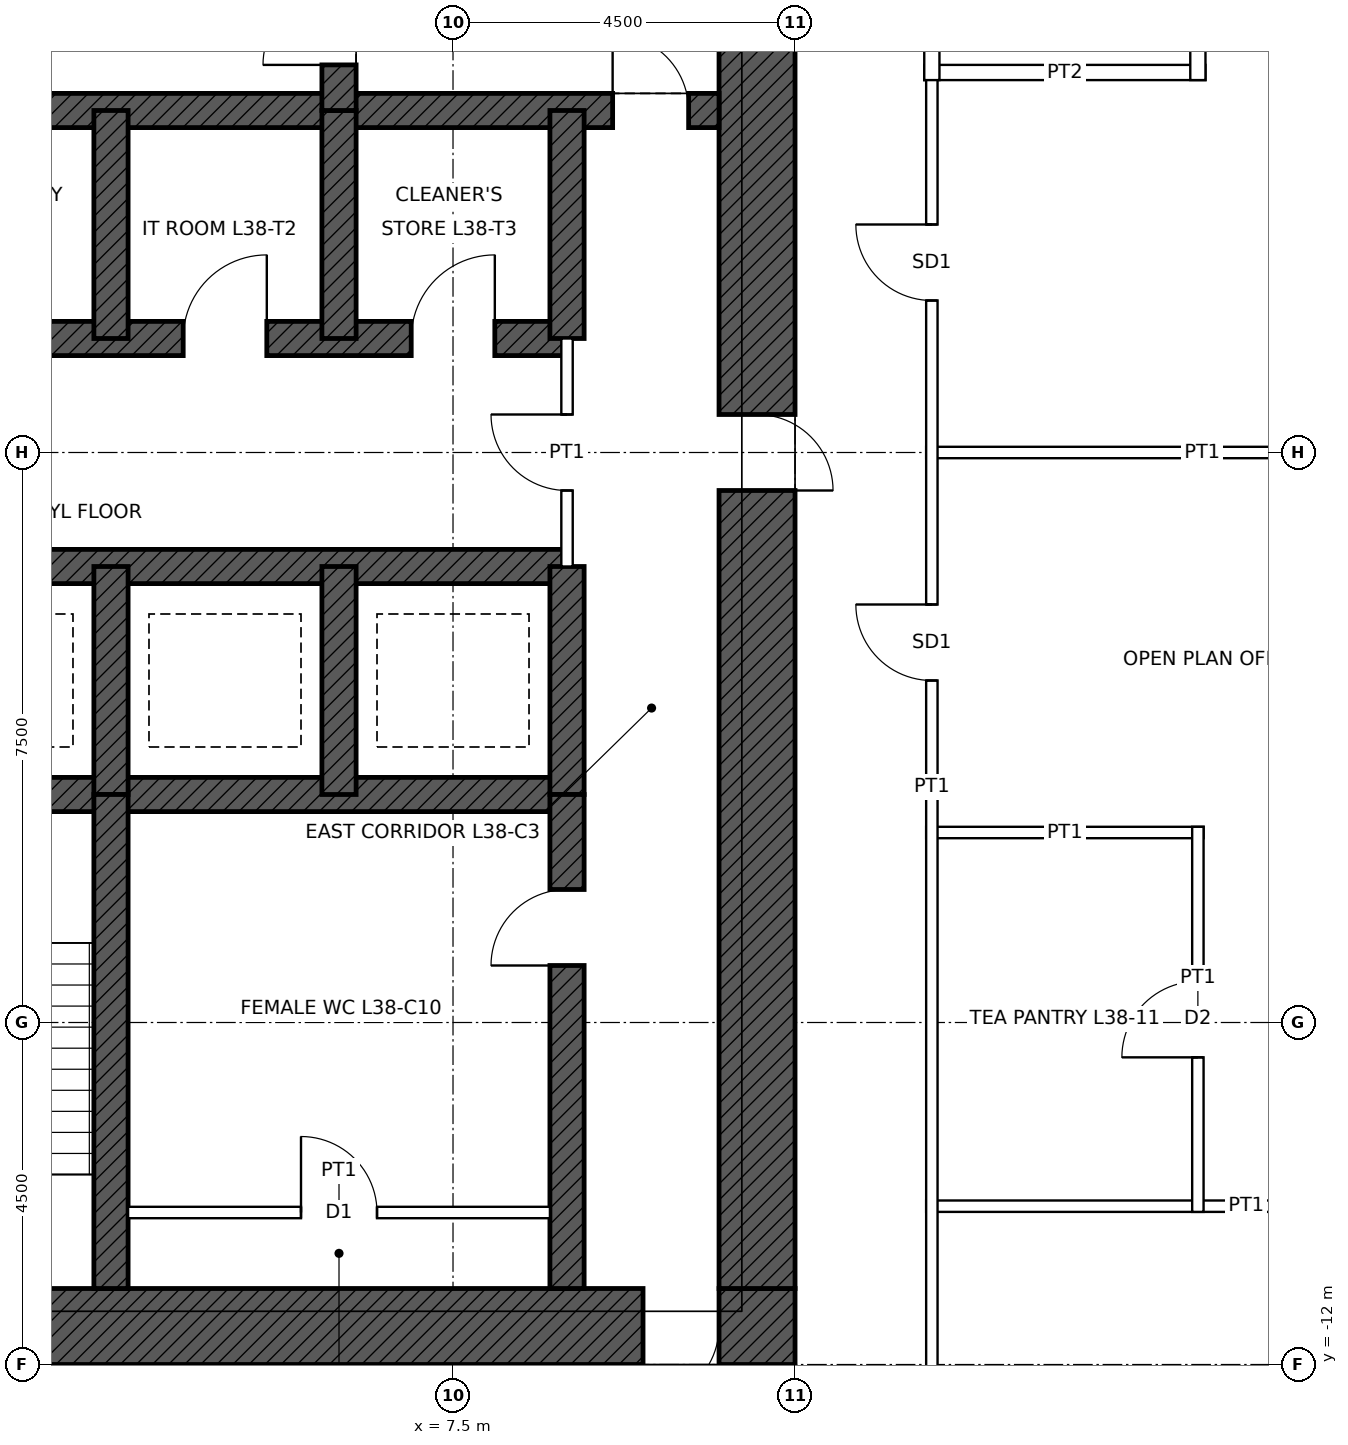
"""IFC4 building model, lengths in metres.
Left out: names, types, materials, properties, quantities, classifications, styles, units other than length and angle.
Written with IfcOpenShell. Run it as: python <this file> out.ifc"""

import sys

from ifc_helpers import new_model, si_unit, direction, frame, frame_2d, origin, place, context, subcontext, project, spatial, rectangle, extrude, element, fill, save


model = new_model("IFC4")
c1 = context("Model", 3, precision=1e-05, world=origin(), true_north=direction((0.0, 1.0)))
c2 = subcontext(c1, "Body", "Model", "MODEL_VIEW")
j1 = project(units=[si_unit("LENGTHUNIT", "METRE"), si_unit("PLANEANGLEUNIT", "RADIAN")], contexts=[c1])
p1 = place(None, origin())
s1 = spatial("IfcSite", under=j1, at=p1, CompositionType="ELEMENT")
p2 = place(p1, origin())
s2 = spatial("IfcBuilding", under=s1, at=p2, CompositionType="ELEMENT")
p3 = place(p2, frame((0.0, 0.0, 185.9)))
s3 = spatial("IfcBuildingStorey", under=s2, at=p3, CompositionType="ELEMENT", Elevation=185.9)
p4 = place(p3, frame((12.0, -11.5, 0.0), z_axis=(0.0, 0.0, 1.0), x_axis=(-1.0, 0.0, 0.0)))
e1 = element("IfcWall", 1, at=p4, inside=s3, PredefinedType="SHEAR", context=c2, shape_type="SweptSolid", body=[
    extrude(rectangle(XDim=24.0, YDim=1.0, at=frame_2d((12.0, 0.0))), origin(), (0.0, 0.0, 1.0), 4.0),
])
p5 = place(p4, frame((11.5, 0.0, 0.0)))
e2 = element("IfcOpeningElement", 2, at=p5, cuts=e1, PredefinedType="OPENING", context=c2, shape_type="SweptSolid", body=[
    extrude(rectangle(XDim=1.0, YDim=2.1, at=frame_2d((0.5, 1.05))), frame((0.0, 0.51, 0.0), z_axis=(0.0, -1.0, 0.0), x_axis=(1.0, 0.0, 0.0)), (0.0, 0.0, 1.0), 1.02),
])
p6 = place(p4, frame((1.0, 0.0, 0.0)))
e3 = element("IfcOpeningElement", 3, at=p6, cuts=e1, PredefinedType="OPENING", context=c2, shape_type="SweptSolid", body=[
    extrude(rectangle(XDim=1.0, YDim=2.4, at=frame_2d((0.5, 1.2))), frame((0.0, 0.51, 0.0), z_axis=(0.0, -1.0, 0.0), x_axis=(1.0, 0.0, 0.0)), (0.0, 0.0, 1.0), 1.02),
])
p7 = place(p3, frame((11.5, 11.0, 0.0), z_axis=(0.0, 0.0, 1.0), x_axis=(0.0, -1.0, 0.0)))
e4 = element("IfcWall", 4, at=p7, inside=s3, PredefinedType="SHEAR", context=c2, shape_type="SweptSolid", body=[
    extrude(rectangle(XDim=22.0, YDim=1.0, at=frame_2d((11.0, 0.0))), origin(), (0.0, 0.0, 1.0), 4.0),
])
p8 = place(p7, frame((10.5, 0.0, 0.0)))
e5 = element("IfcOpeningElement", 5, at=p8, cuts=e4, PredefinedType="OPENING", context=c2, shape_type="SweptSolid", body=[
    extrude(rectangle(XDim=1.0, YDim=2.4, at=frame_2d((0.5, 1.2))), frame((0.0, 0.51, 0.0), z_axis=(0.0, -1.0, 0.0), x_axis=(1.0, 0.0, 0.0)), (0.0, 0.0, 1.0), 1.02),
])
p9 = place(p3, frame((-11.0, 4.5, 0.0), z_axis=(0.0, 0.0, 1.0), x_axis=(1.0, 0.0, 0.0)))
e6 = element("IfcWall", 6, at=p9, inside=s3, PredefinedType="SHEAR", context=c2, shape_type="SweptSolid", body=[
    extrude(rectangle(XDim=22.0, YDim=0.45, at=frame_2d((11.0, 0.0))), origin(), (0.0, 0.0, 1.0), 4.0),
])
p10 = place(p9, frame((0.4, 0.0, 0.0)))
e7 = element("IfcOpeningElement", 7, at=p10, cuts=e6, PredefinedType="OPENING", context=c2, shape_type="SweptSolid", body=[
    extrude(rectangle(XDim=1.0, YDim=2.1, at=frame_2d((0.5, 1.05))), frame((0.0, 0.235, 0.0), z_axis=(0.0, -1.0, 0.0), x_axis=(1.0, 0.0, 0.0)), (0.0, 0.0, 1.0), 0.47),
])
p11 = place(p9, frame((20.6, 0.0, 0.0)))
e8 = element("IfcOpeningElement", 8, at=p11, cuts=e6, PredefinedType="OPENING", context=c2, shape_type="SweptSolid", body=[
    extrude(rectangle(XDim=1.0, YDim=2.1, at=frame_2d((0.5, 1.05))), frame((0.0, 0.235, 0.0), z_axis=(0.0, -1.0, 0.0), x_axis=(1.0, 0.0, 0.0)), (0.0, 0.0, 1.0), 0.47),
])
p12 = place(p3, frame((-9.0, 1.5, 0.0), z_axis=(0.0, 0.0, 1.0), x_axis=(1.0, 0.0, 0.0)))
e9 = element("IfcWall", 9, at=p12, inside=s3, PredefinedType="SHEAR", context=c2, shape_type="SweptSolid", body=[
    extrude(rectangle(XDim=18.0, YDim=0.45, at=frame_2d((9.0, 0.0))), origin(), (0.0, 0.0, 1.0), 4.0),
])
p13 = place(p12, frame((0.95, 0.0, 0.0)))
e10 = element("IfcOpeningElement", 10, at=p13, cuts=e9, PredefinedType="OPENING", context=c2, shape_type="SweptSolid", body=[
    extrude(rectangle(XDim=1.1, YDim=2.1, at=frame_2d((0.55, 1.05))), frame((0.0, 0.235, 0.0), z_axis=(0.0, -1.0, 0.0), x_axis=(1.0, 0.0, 0.0)), (0.0, 0.0, 1.0), 0.47),
])
p14 = place(p12, frame((3.95, 0.0, 0.0)))
e11 = element("IfcOpeningElement", 11, at=p14, cuts=e9, PredefinedType="OPENING", context=c2, shape_type="SweptSolid", body=[
    extrude(rectangle(XDim=1.1, YDim=2.1, at=frame_2d((0.55, 1.05))), frame((0.0, 0.235, 0.0), z_axis=(0.0, -1.0, 0.0), x_axis=(1.0, 0.0, 0.0)), (0.0, 0.0, 1.0), 0.47),
])
p15 = place(p12, frame((6.95, 0.0, 0.0)))
e12 = element("IfcOpeningElement", 12, at=p15, cuts=e9, PredefinedType="OPENING", context=c2, shape_type="SweptSolid", body=[
    extrude(rectangle(XDim=1.1, YDim=2.1, at=frame_2d((0.55, 1.05))), frame((0.0, 0.235, 0.0), z_axis=(0.0, -1.0, 0.0), x_axis=(1.0, 0.0, 0.0)), (0.0, 0.0, 1.0), 0.47),
])
p16 = place(p12, frame((9.95, 0.0, 0.0)))
e13 = element("IfcOpeningElement", 13, at=p16, cuts=e9, PredefinedType="OPENING", context=c2, shape_type="SweptSolid", body=[
    extrude(rectangle(XDim=1.1, YDim=2.1, at=frame_2d((0.55, 1.05))), frame((0.0, 0.235, 0.0), z_axis=(0.0, -1.0, 0.0), x_axis=(1.0, 0.0, 0.0)), (0.0, 0.0, 1.0), 0.47),
])
p17 = place(p12, frame((12.95, 0.0, 0.0)))
e14 = element("IfcOpeningElement", 14, at=p17, cuts=e9, PredefinedType="OPENING", context=c2, shape_type="SweptSolid", body=[
    extrude(rectangle(XDim=1.1, YDim=2.1, at=frame_2d((0.55, 1.05))), frame((0.0, 0.235, 0.0), z_axis=(0.0, -1.0, 0.0), x_axis=(1.0, 0.0, 0.0)), (0.0, 0.0, 1.0), 0.47),
])
p18 = place(p12, frame((15.95, 0.0, 0.0)))
e15 = element("IfcOpeningElement", 15, at=p18, cuts=e9, PredefinedType="OPENING", context=c2, shape_type="SweptSolid", body=[
    extrude(rectangle(XDim=1.1, YDim=2.1, at=frame_2d((0.55, 1.05))), frame((0.0, 0.235, 0.0), z_axis=(0.0, -1.0, 0.0), x_axis=(1.0, 0.0, 0.0)), (0.0, 0.0, 1.0), 0.47),
])
p19 = place(p3, frame((-9.0, -1.5, 0.0), z_axis=(0.0, 0.0, 1.0), x_axis=(1.0, 0.0, 0.0)))
e16 = element("IfcWall", 16, at=p19, inside=s3, PredefinedType="SHEAR", context=c2, shape_type="SweptSolid", body=[
    extrude(rectangle(XDim=18.0, YDim=0.45, at=frame_2d((9.0, 0.0))), origin(), (0.0, 0.0, 1.0), 4.0),
])
p20 = place(p19, frame((0.95, 0.0, 0.0)))
e17 = element("IfcOpeningElement", 17, at=p20, cuts=e16, PredefinedType="OPENING", context=c2, shape_type="SweptSolid", body=[
    extrude(rectangle(XDim=1.1, YDim=2.1, at=frame_2d((0.55, 1.05))), frame((0.0, 0.235, 0.0), z_axis=(0.0, -1.0, 0.0), x_axis=(1.0, 0.0, 0.0)), (0.0, 0.0, 1.0), 0.47),
])
p21 = place(p19, frame((3.95, 0.0, 0.0)))
e18 = element("IfcOpeningElement", 18, at=p21, cuts=e16, PredefinedType="OPENING", context=c2, shape_type="SweptSolid", body=[
    extrude(rectangle(XDim=1.1, YDim=2.1, at=frame_2d((0.55, 1.05))), frame((0.0, 0.235, 0.0), z_axis=(0.0, -1.0, 0.0), x_axis=(1.0, 0.0, 0.0)), (0.0, 0.0, 1.0), 0.47),
])
p22 = place(p19, frame((6.95, 0.0, 0.0)))
e19 = element("IfcOpeningElement", 19, at=p22, cuts=e16, PredefinedType="OPENING", context=c2, shape_type="SweptSolid", body=[
    extrude(rectangle(XDim=1.1, YDim=2.1, at=frame_2d((0.55, 1.05))), frame((0.0, 0.235, 0.0), z_axis=(0.0, -1.0, 0.0), x_axis=(1.0, 0.0, 0.0)), (0.0, 0.0, 1.0), 0.47),
])
p23 = place(p3, frame((-9.0, -4.5, 0.0), z_axis=(0.0, 0.0, 1.0), x_axis=(1.0, 0.0, 0.0)))
e20 = element("IfcWall", 20, at=p23, inside=s3, PredefinedType="SHEAR", context=c2, shape_type="SweptSolid", body=[
    extrude(rectangle(XDim=18.0, YDim=0.45, at=frame_2d((9.0, 0.0))), origin(), (0.0, 0.0, 1.0), 4.0),
])
for number, where, z_axis, x_axis in (
    (21, (9.0, 1.5, 0.0), (0.0, 0.0, 1.0), (0.0, 1.0, 0.0)),
    (22, (9.0, -4.5, 0.0), (0.0, 0.0, 1.0), (0.0, 1.0, 0.0)),
    (23, (3.0, 1.5, 0.0), (0.0, 0.0, 1.0), (0.0, 1.0, 0.0)),
    (24, (6.0, 1.5, 0.0), (0.0, 0.0, 1.0), (0.0, 1.0, 0.0)),
    (25, (3.0, -4.5, 0.0), (0.0, 0.0, 1.0), (0.0, 1.0, 0.0)),
    (26, (6.0, -4.5, 0.0), (0.0, 0.0, 1.0), (0.0, 1.0, 0.0)),
):
    element("IfcWall", number, at=place(p3, frame(where, z_axis=z_axis, x_axis=x_axis)), inside=s3, PredefinedType="SHEAR", context=c2, shape_type="SweptSolid", body=[
        extrude(rectangle(XDim=3.0, YDim=0.45, at=frame_2d((1.5, 0.0))), origin(), (0.0, 0.0, 1.0), 4.0),
    ])
p24 = place(p3, frame((6.0, 4.5, 0.0), z_axis=(0.0, 0.0, 1.0), x_axis=(0.0, 1.0, 0.0)))
e27 = element("IfcWall", 27, at=p24, inside=s3, PredefinedType="SHEAR", context=c2, shape_type="SweptSolid", body=[
    extrude(rectangle(XDim=6.5, YDim=0.45, at=frame_2d((3.25, 0.0))), origin(), (0.0, 0.0, 1.0), 4.0),
])
p25 = place(p24, frame((0.6, 0.0, 0.0)))
e28 = element("IfcOpeningElement", 28, at=p25, cuts=e27, PredefinedType="OPENING", context=c2, shape_type="SweptSolid", body=[
    extrude(rectangle(XDim=1.0, YDim=2.1, at=frame_2d((0.5, 1.05))), frame((0.0, 0.235, 0.0), z_axis=(0.0, -1.0, 0.0), x_axis=(1.0, 0.0, 0.0)), (0.0, 0.0, 1.0), 0.47),
])
p26 = place(p3, frame((9.0, -11.0, 0.0), z_axis=(0.0, 0.0, 1.0), x_axis=(0.0, 1.0, 0.0)))
e29 = element("IfcWall", 29, at=p26, inside=s3, PredefinedType="SHEAR", context=c2, shape_type="SweptSolid", body=[
    extrude(rectangle(XDim=6.5, YDim=0.45, at=frame_2d((3.25, 0.0))), origin(), (0.0, 0.0, 1.0), 4.0),
])
p27 = place(p26, frame((4.25, 0.0, 0.0)))
e30 = element("IfcOpeningElement", 30, at=p27, cuts=e29, PredefinedType="OPENING", context=c2, shape_type="SweptSolid", body=[
    extrude(rectangle(XDim=1.0, YDim=2.1, at=frame_2d((0.5, 1.05))), frame((0.0, 0.235, 0.0), z_axis=(0.0, -1.0, 0.0), x_axis=(1.0, 0.0, 0.0)), (0.0, 0.0, 1.0), 0.47),
])
p28 = place(p3, frame((3.0, -11.0, 0.0), z_axis=(0.0, 0.0, 1.0), x_axis=(0.0, 1.0, 0.0)))
e31 = element("IfcWall", 31, at=p28, inside=s3, PredefinedType="SHEAR", context=c2, shape_type="SweptSolid", body=[
    extrude(rectangle(XDim=6.5, YDim=0.45, at=frame_2d((3.25, 0.0))), origin(), (0.0, 0.0, 1.0), 4.0),
])
p29 = place(p3, frame((13.725, -9.917, 0.0), z_axis=(0.0, 0.0, 1.0), x_axis=(1.0, 0.0, 0.0)))
e32 = element("IfcWall", 32, at=p29, inside=s3, PredefinedType="PARTITIONING", context=c2, shape_type="SweptSolid", body=[
    extrude(rectangle(XDim=8.425, YDim=0.15, at=frame_2d((4.212, 0.0))), origin(), (0.0, 0.0, 1.0), 3.85),
])
p30 = place(p3, frame((13.725, -5.0, 0.0), z_axis=(0.0, 0.0, 1.0), x_axis=(1.0, 0.0, 0.0)))
e33 = element("IfcWall", 33, at=p30, inside=s3, PredefinedType="PARTITIONING", context=c2, shape_type="SweptSolid", body=[
    extrude(rectangle(XDim=3.65, YDim=0.15, at=frame_2d((1.825, 0.0))), origin(), (0.0, 0.0, 1.0), 3.85),
])
p31 = place(p3, frame((13.725, 0.0, 0.0), z_axis=(0.0, 0.0, 1.0), x_axis=(1.0, 0.0, 0.0)))
e34 = element("IfcWall", 34, at=p31, inside=s3, PredefinedType="PARTITIONING", context=c2, shape_type="SweptSolid", body=[
    extrude(rectangle(XDim=7.265, YDim=0.15, at=frame_2d((3.632, 0.0))), origin(), (0.0, 0.0, 1.0), 3.238),
])
p32 = place(p3, frame((13.7, 5.0, 0.0), z_axis=(0.0, 0.0, 1.0), x_axis=(1.0, 0.0, 0.0)))
e35 = element("IfcWall", 35, at=p32, inside=s3, PredefinedType="PARTITIONING", context=c2, shape_type="SweptSolid", body=[
    extrude(rectangle(XDim=3.7, YDim=0.2, at=frame_2d((1.85, 0.0))), origin(), (0.0, 0.0, 1.0), 3.85),
])
p33 = place(p3, frame((13.8, -13.875, 0.0), z_axis=(0.0, 0.0, 1.0), x_axis=(0.0, 1.0, 0.0)))
e36 = element("IfcWall", 36, at=p33, inside=s3, PredefinedType="PARTITIONING", context=c2, shape_type="SweptSolid", body=[
    extrude(rectangle(XDim=18.95, YDim=0.15, at=frame_2d((9.475, 0.0))), origin(), (0.0, 0.0, 1.0), 3.85),
])
p34 = place(p33, frame((15.875, 0.0, 0.0)))
e37 = element("IfcOpeningElement", 37, at=p34, cuts=e36, PredefinedType="OPENING", context=c2, shape_type="SweptSolid", body=[
    extrude(rectangle(XDim=1.0, YDim=2.4, at=frame_2d((0.5, 1.2))), frame((0.0, 0.085, 0.0), z_axis=(0.0, -1.0, 0.0), x_axis=(1.0, 0.0, 0.0)), (0.0, 0.0, 1.0), 0.17),
])
p35 = place(p33, frame((10.875, 0.0, 0.0)))
e38 = element("IfcOpeningElement", 38, at=p35, cuts=e36, PredefinedType="OPENING", context=c2, shape_type="SweptSolid", body=[
    extrude(rectangle(XDim=1.0, YDim=2.4, at=frame_2d((0.5, 1.2))), frame((0.0, 0.085, 0.0), z_axis=(0.0, -1.0, 0.0), x_axis=(1.0, 0.0, 0.0)), (0.0, 0.0, 1.0), 0.17),
])
p36 = place(p3, frame((13.8, 4.9, 0.0), z_axis=(0.0, 0.0, 1.0), x_axis=(0.0, 1.0, 0.0)))
e39 = element("IfcWall", 39, at=p36, inside=s3, PredefinedType="PARTITIONING", context=c2, shape_type="SweptSolid", body=[
    extrude(rectangle(XDim=5.117, YDim=0.2, at=frame_2d((2.559, 0.0))), origin(), (0.0, 0.0, 1.0), 3.85),
])
p37 = place(p3, frame((17.3, -9.992, 0.0), z_axis=(0.0, 0.0, 1.0), x_axis=(0.0, 1.0, 0.0)))
e40 = element("IfcWall", 40, at=p37, inside=s3, PredefinedType="PARTITIONING", context=c2, shape_type="SweptSolid", body=[
    extrude(rectangle(XDim=5.067, YDim=0.15, at=frame_2d((2.533, 0.0))), origin(), (0.0, 0.0, 1.0), 3.85),
])
p38 = place(p37, frame((2.033, 0.0, 0.0)))
e41 = element("IfcOpeningElement", 41, at=p38, cuts=e40, PredefinedType="OPENING", context=c2, shape_type="SweptSolid", body=[
    extrude(rectangle(XDim=1.0, YDim=2.1, at=frame_2d((0.5, 1.05))), frame((0.0, 0.085, 0.0), z_axis=(0.0, -1.0, 0.0), x_axis=(1.0, 0.0, 0.0)), (0.0, 0.0, 1.0), 0.17),
])
p39 = place(p3, frame((17.3, 4.9, 0.0), z_axis=(0.0, 0.0, 1.0), x_axis=(0.0, 1.0, 0.0)))
e42 = element("IfcWall", 42, at=p39, inside=s3, PredefinedType="PARTITIONING", context=c2, shape_type="SweptSolid", body=[
    extrude(rectangle(XDim=5.117, YDim=0.2, at=frame_2d((2.559, 0.0))), origin(), (0.0, 0.0, 1.0), 3.85),
])
p40 = place(p39, frame((2.059, 0.0, 0.0)))
e43 = element("IfcOpeningElement", 43, at=p40, cuts=e42, PredefinedType="OPENING", context=c2, shape_type="SweptSolid", body=[
    extrude(rectangle(XDim=1.0, YDim=2.1, at=frame_2d((0.5, 1.05))), frame((0.0, 0.11, 0.0), z_axis=(0.0, -1.0, 0.0), x_axis=(1.0, 0.0, 0.0)), (0.0, 0.0, 1.0), 0.22),
])
p41 = place(p3, frame((3.225, -10.0, 0.0), z_axis=(0.0, 0.0, 1.0), x_axis=(1.0, 0.0, 0.0)))
e44 = element("IfcWall", 44, at=p41, inside=s3, PredefinedType="PARTITIONING", context=c2, shape_type="SweptSolid", body=[
    extrude(rectangle(XDim=5.55, YDim=0.15, at=frame_2d((2.775, 0.0))), origin(), (0.0, 0.0, 1.0), 3.75),
])
p42 = place(p41, frame((2.275, 0.0, 0.0)))
e45 = element("IfcOpeningElement", 45, at=p42, cuts=e44, PredefinedType="OPENING", context=c2, shape_type="SweptSolid", body=[
    extrude(rectangle(XDim=1.0, YDim=2.1, at=frame_2d((0.5, 1.05))), frame((0.0, 0.085, 0.0), z_axis=(0.0, -1.0, 0.0), x_axis=(1.0, 0.0, 0.0)), (0.0, 0.0, 1.0), 0.17),
])
p43 = place(p3, frame((9.0, -1.5, 0.0), z_axis=(0.0, 0.0, 1.0), x_axis=(0.0, 1.0, 0.0)))
e46 = element("IfcWall", 46, at=p43, inside=s3, PredefinedType="PARTITIONING", context=c2, shape_type="SweptSolid", body=[
    extrude(rectangle(XDim=3.0, YDim=0.15, at=frame_2d((1.5, 0.0))), origin(), (0.0, 0.0, 1.0), 3.75),
])
p44 = place(p43, frame((1.0, 0.0, 0.0)))
e47 = element("IfcOpeningElement", 47, at=p44, cuts=e46, PredefinedType="OPENING", context=c2, shape_type="SweptSolid", body=[
    extrude(rectangle(XDim=1.0, YDim=2.4, at=frame_2d((0.5, 1.2))), frame((0.0, 0.085, 0.0), z_axis=(0.0, -1.0, 0.0), x_axis=(1.0, 0.0, 0.0)), (0.0, 0.0, 1.0), 0.17),
])
p45 = place(p11, origin())
e48 = element("IfcDoor", 48, at=p45, inside=s3, OperationType="SINGLE_SWING_LEFT", PredefinedType="DOOR", context=c2, shape_type="SweptSolid", body=[
    extrude(rectangle(XDim=1.0, YDim=2.1, at=frame_2d((0.5, 1.05))), frame((0.0, 0.025, 0.0), z_axis=(0.0, -1.0, 0.0), x_axis=(1.0, 0.0, 0.0)), (0.0, 0.0, 1.0), 0.05),
])
fill(e8, e48)
p46 = place(p25, origin())
e49 = element("IfcDoor", 49, at=p46, inside=s3, OperationType="SINGLE_SWING_LEFT", PredefinedType="DOOR", context=c2, shape_type="SweptSolid", body=[
    extrude(rectangle(XDim=1.0, YDim=2.1, at=frame_2d((0.5, 1.05))), frame((0.0, 0.025, 0.0), z_axis=(0.0, -1.0, 0.0), x_axis=(1.0, 0.0, 0.0)), (0.0, 0.0, 1.0), 0.05),
])
fill(e28, e49)
p47 = place(p8, origin())
e50 = element("IfcDoor", 50, at=p47, inside=s3, OperationType="SINGLE_SWING_RIGHT", PredefinedType="DOOR", context=c2, shape_type="SweptSolid", body=[
    extrude(rectangle(XDim=1.0, YDim=2.4, at=frame_2d((0.5, 1.2))), frame((0.0, 0.485, 0.0), z_axis=(0.0, -1.0, 0.0), x_axis=(1.0, 0.0, 0.0)), (0.0, 0.0, 1.0), 0.05),
])
fill(e5, e50)
p48 = place(p6, origin())
e51 = element("IfcDoor", 51, at=p48, inside=s3, OperationType="SINGLE_SWING_RIGHT", PredefinedType="DOOR", context=c2, shape_type="SweptSolid", body=[
    extrude(rectangle(XDim=1.0, YDim=2.4, at=frame_2d((0.5, 1.2))), frame((0.0, 0.485, 0.0), z_axis=(0.0, -1.0, 0.0), x_axis=(1.0, 0.0, 0.0)), (0.0, 0.0, 1.0), 0.05),
])
fill(e3, e51)
p49 = place(p27, origin())
e52 = element("IfcDoor", 52, at=p49, inside=s3, OperationType="SINGLE_SWING_LEFT", PredefinedType="DOOR", context=c2, shape_type="SweptSolid", body=[
    extrude(rectangle(XDim=1.0, YDim=2.1, at=frame_2d((0.5, 1.05))), frame((0.0, 0.025, 0.0), z_axis=(0.0, -1.0, 0.0), x_axis=(1.0, 0.0, 0.0)), (0.0, 0.0, 1.0), 0.05),
])
fill(e30, e52)
p50 = place(p42, origin())
e53 = element("IfcDoor", 53, at=p50, inside=s3, OperationType="SINGLE_SWING_LEFT", PredefinedType="DOOR", context=c2, shape_type="SweptSolid", body=[
    extrude(rectangle(XDim=1.0, YDim=2.1, at=frame_2d((0.5, 1.05))), frame((0.0, 0.025, 0.0), z_axis=(0.0, -1.0, 0.0), x_axis=(1.0, 0.0, 0.0)), (0.0, 0.0, 1.0), 0.05),
])
fill(e45, e53)
p51 = place(p44, origin())
e54 = element("IfcDoor", 54, at=p51, inside=s3, OperationType="SINGLE_SWING_RIGHT", PredefinedType="DOOR", context=c2, shape_type="SweptSolid", body=[
    extrude(rectangle(XDim=1.0, YDim=2.4, at=frame_2d((0.5, 1.2))), frame((0.0, 0.025, 0.0), z_axis=(0.0, -1.0, 0.0), x_axis=(1.0, 0.0, 0.0)), (0.0, 0.0, 1.0), 0.05),
])
fill(e47, e54)
p52 = place(p17, origin())
e55 = element("IfcDoor", 55, at=p52, inside=s3, OperationType="SINGLE_SWING_RIGHT", PredefinedType="DOOR", context=c2, shape_type="SweptSolid", body=[
    extrude(rectangle(XDim=1.1, YDim=2.1, at=frame_2d((0.55, 1.05))), frame((0.0, 0.025, 0.0), z_axis=(0.0, -1.0, 0.0), x_axis=(1.0, 0.0, 0.0)), (0.0, 0.0, 1.0), 0.05),
])
fill(e14, e55)
p53 = place(p18, origin())
e56 = element("IfcDoor", 56, at=p53, inside=s3, OperationType="SINGLE_SWING_RIGHT", PredefinedType="DOOR", context=c2, shape_type="SweptSolid", body=[
    extrude(rectangle(XDim=1.1, YDim=2.1, at=frame_2d((0.55, 1.05))), frame((0.0, 0.025, 0.0), z_axis=(0.0, -1.0, 0.0), x_axis=(1.0, 0.0, 0.0)), (0.0, 0.0, 1.0), 0.05),
])
fill(e15, e56)
p54 = place(p34, origin())
e57 = element("IfcDoor", 57, at=p54, inside=s3, OperationType="SINGLE_SWING_RIGHT", PredefinedType="DOOR", context=c2, shape_type="SweptSolid", body=[
    extrude(rectangle(XDim=1.0, YDim=2.4, at=frame_2d((0.5, 1.2))), frame((0.0, 0.025, 0.0), z_axis=(0.0, -1.0, 0.0), x_axis=(1.0, 0.0, 0.0)), (0.0, 0.0, 1.0), 0.05),
])
fill(e37, e57)
p55 = place(p35, origin())
e58 = element("IfcDoor", 58, at=p55, inside=s3, OperationType="SINGLE_SWING_RIGHT", PredefinedType="DOOR", context=c2, shape_type="SweptSolid", body=[
    extrude(rectangle(XDim=1.0, YDim=2.4, at=frame_2d((0.5, 1.2))), frame((0.0, 0.025, 0.0), z_axis=(0.0, -1.0, 0.0), x_axis=(1.0, 0.0, 0.0)), (0.0, 0.0, 1.0), 0.05),
])
fill(e38, e58)
p56 = place(p38, origin())
e59 = element("IfcDoor", 59, at=p56, inside=s3, OperationType="SINGLE_SWING_LEFT", PredefinedType="DOOR", context=c2, shape_type="SweptSolid", body=[
    extrude(rectangle(XDim=1.0, YDim=2.1, at=frame_2d((0.5, 1.05))), frame((0.0, 0.025, 0.0), z_axis=(0.0, -1.0, 0.0), x_axis=(1.0, 0.0, 0.0)), (0.0, 0.0, 1.0), 0.05),
])
fill(e41, e59)
save(model, sys.argv[1])
